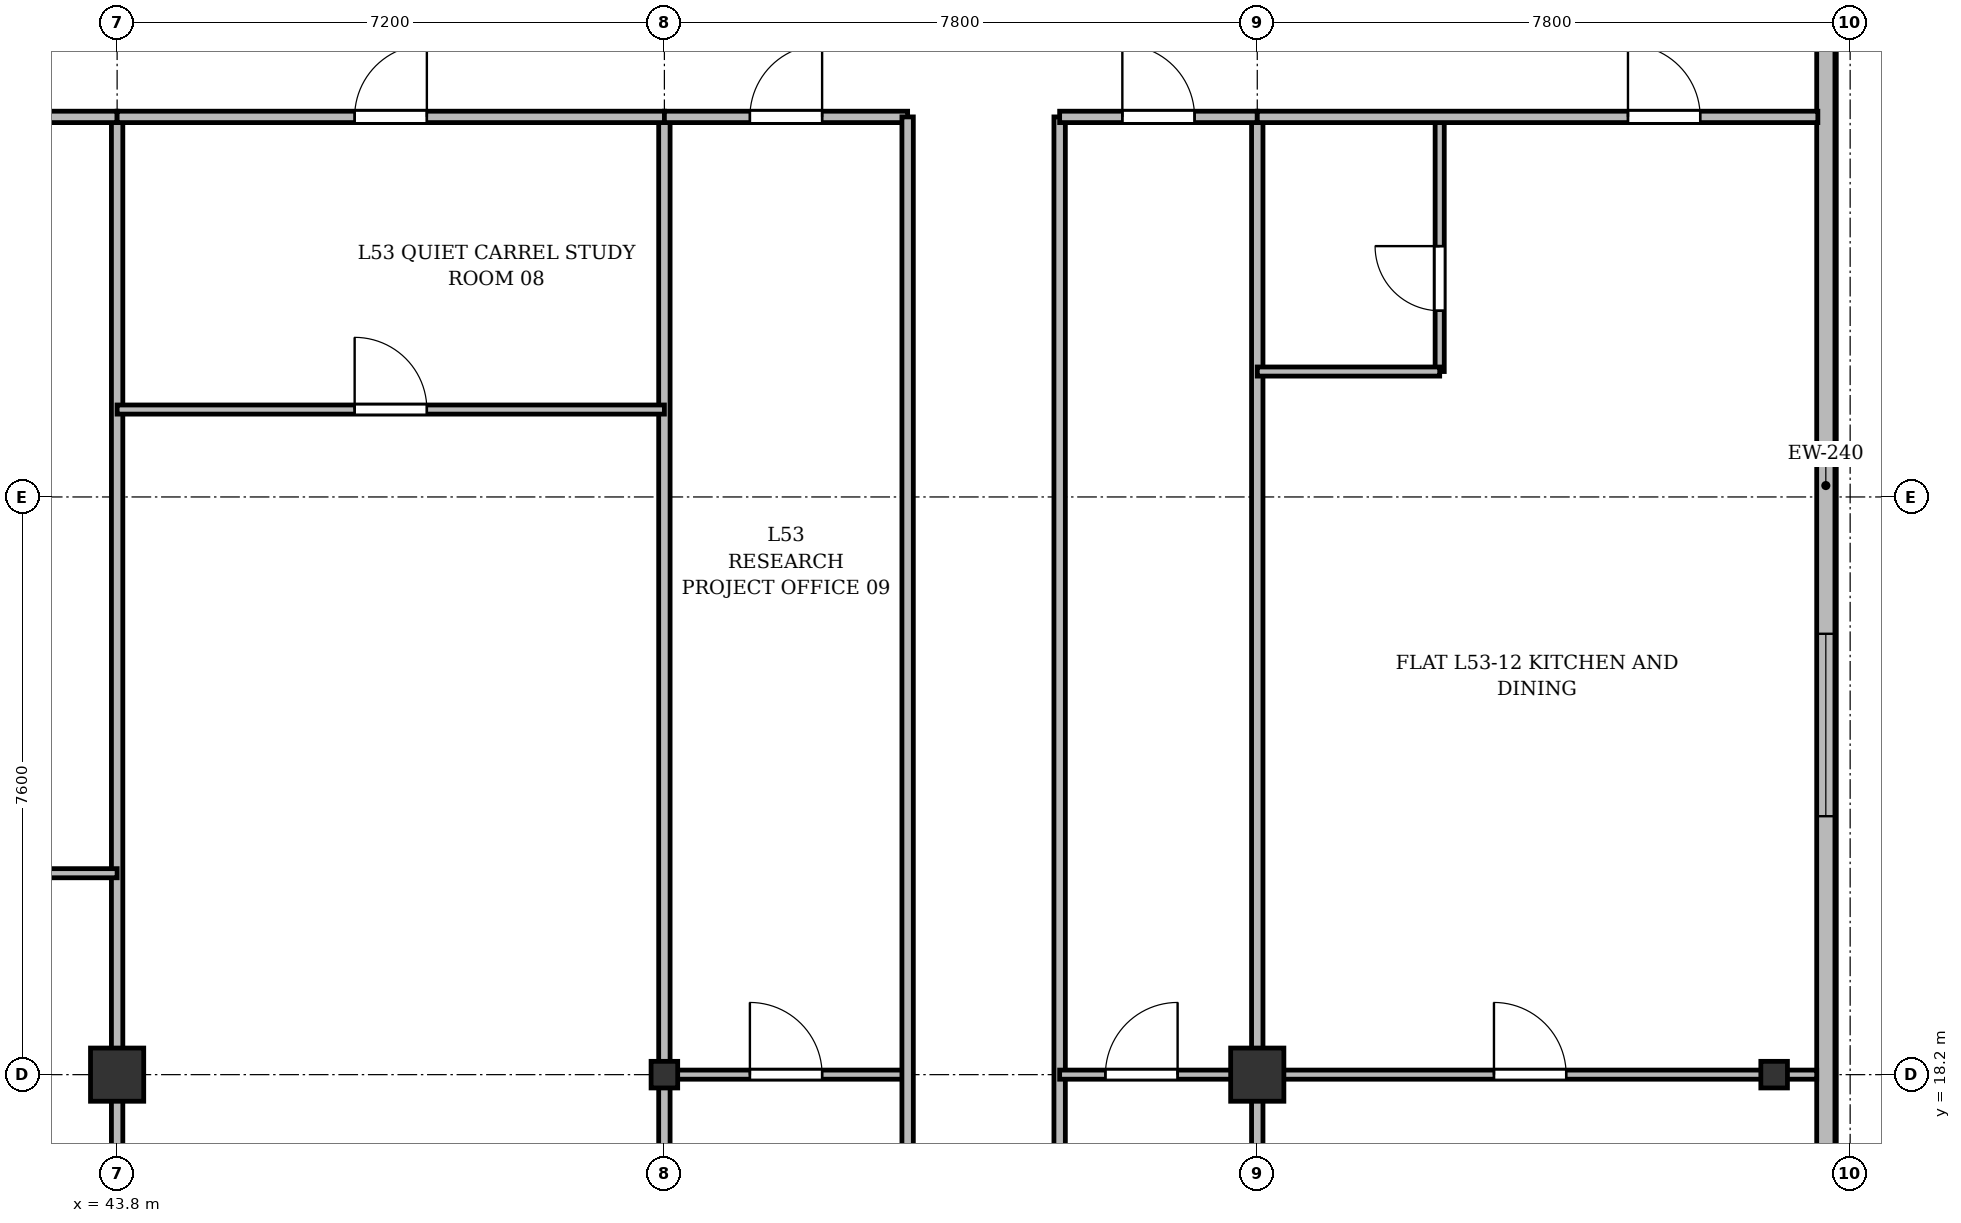
"""IFC4 building model, lengths in metres.
Left out: names, types, materials, properties, quantities, classifications, styles, units other than length and angle.
Written with IfcOpenShell. Run it as: python <this file> out.ifc"""

import sys

from ifc_helpers import new_model, si_unit, direction, frame, frame_2d, origin, origin_2d, place, context, subcontext, project, spatial, rectangle, i_section, extrude, source, transform, mapped, element, fill, save


model = new_model("IFC4")
c1 = context("Model", 3, precision=1e-05, world=origin(), true_north=direction((0.0, 1.0)))
c2 = subcontext(c1, "Body", "Model", "MODEL_VIEW")
j1 = project(units=[si_unit("LENGTHUNIT", "METRE"), si_unit("PLANEANGLEUNIT", "RADIAN")], contexts=[c1])
p1 = place(None, origin())
s1 = spatial("IfcSite", under=j1, at=p1, CompositionType="ELEMENT")
p2 = place(p1, origin())
s2 = spatial("IfcBuilding", under=s1, at=p2, CompositionType="ELEMENT")
p3 = place(p2, frame((0.0, 0.0, 204.9)))
s3 = spatial("IfcBuildingStorey", under=s2, at=p3, CompositionType="ELEMENT", Elevation=204.9)
m1 = source(origin(), c2, "Body", "SweptSolid", [
    extrude(rectangle(XDim=0.7, YDim=0.7, at=origin_2d()), origin(), (0.0, 0.0, 1.0), 3.6),
])
p4 = place(p3, frame((43.8, 18.2, 0.0), z_axis=(0.0, 0.0, 1.0), x_axis=(1.0, 0.0, 0.0)))
e1 = element("IfcColumn", 1, at=p4, inside=s3, PredefinedType="COLUMN", context=c2, shape_type="MappedRepresentation", body=[
    mapped(m1, transform((0.0, 0.0, 0.0), x_axis=(1.0, 0.0, 0.0), y_axis=(0.0, 1.0, 0.0), z_axis=(0.0, 0.0, 1.0), scale=1.0)),
])
m2 = source(origin(), c2, "Body", "SweptSolid", [
    extrude(i_section(OverallWidth=0.35, OverallDepth=0.35, WebThickness=0.018, FlangeThickness=0.028, at=origin_2d()), origin(), (0.0, 0.0, 1.0), 3.6),
])
p5 = place(p3, frame((51.0, 18.2, 0.0), z_axis=(0.0, 0.0, 1.0), x_axis=(1.0, 0.0, 0.0)))
e2 = element("IfcColumn", 2, at=p5, inside=s3, PredefinedType="COLUMN", context=c2, shape_type="MappedRepresentation", body=[
    mapped(m2, transform((0.0, 0.0, 0.0), x_axis=(1.0, 0.0, 0.0), y_axis=(0.0, 1.0, 0.0), z_axis=(0.0, 0.0, 1.0), scale=1.0)),
])
p6 = place(p3, frame((58.8, 18.2, 0.0), z_axis=(0.0, 0.0, 1.0), x_axis=(1.0, 0.0, 0.0)))
e3 = element("IfcColumn", 3, at=p6, inside=s3, PredefinedType="COLUMN", context=c2, shape_type="MappedRepresentation", body=[
    mapped(m1, transform((0.0, 0.0, 0.0), x_axis=(1.0, 0.0, 0.0), y_axis=(0.0, 1.0, 0.0), z_axis=(0.0, 0.0, 1.0), scale=1.0)),
])
p7 = place(p3, frame((65.6, 18.2, 0.0), z_axis=(0.0, 0.0, 1.0), x_axis=(1.0, 0.0, 0.0)))
e4 = element("IfcColumn", 4, at=p7, inside=s3, PredefinedType="COLUMN", context=c2, shape_type="MappedRepresentation", body=[
    mapped(m2, transform((0.0, 0.0, 0.0), x_axis=(1.0, 0.0, 0.0), y_axis=(0.0, 1.0, 0.0), z_axis=(0.0, 0.0, 1.0), scale=1.0)),
])
p8 = place(p3, frame((66.28, 45.5, 0.0), z_axis=(0.0, 0.0, 1.0), x_axis=(0.0, -1.0, 0.0)))
e5 = element("IfcWall", 5, at=p8, inside=s3, PredefinedType="SOLIDWALL", context=c2, shape_type="SweptSolid", body=[
    extrude(rectangle(XDim=39.1, YDim=0.24, at=frame_2d((19.55, 0.0))), origin(), (0.0, 0.0, 1.0), 3.36),
])
p9 = place(p8, frame((36.45, 0.0, 0.92)))
e6 = element("IfcOpeningElement", 6, at=p9, cuts=e5, PredefinedType="OPENING", context=c2, shape_type="SweptSolid", body=[
    extrude(rectangle(XDim=1.2, YDim=1.65, at=frame_2d((0.6, 0.825))), frame((0.0, 0.13, 0.0), z_axis=(0.0, -1.0, 0.0), x_axis=(1.0, 0.0, 0.0)), (0.0, 0.0, 1.0), 0.26),
])
p10 = place(p8, frame((32.9, 0.0, 0.92)))
e7 = element("IfcOpeningElement", 7, at=p10, cuts=e5, PredefinedType="OPENING", context=c2, shape_type="SweptSolid", body=[
    extrude(rectangle(XDim=2.4, YDim=2.1, at=frame_2d((1.2, 1.05))), frame((0.0, 0.13, 0.0), z_axis=(0.0, -1.0, 0.0), x_axis=(1.0, 0.0, 0.0)), (0.0, 0.0, 1.0), 0.26),
])
p11 = place(p8, frame((28.7, 0.0, 0.92)))
e8 = element("IfcOpeningElement", 8, at=p11, cuts=e5, PredefinedType="OPENING", context=c2, shape_type="SweptSolid", body=[
    extrude(rectangle(XDim=2.4, YDim=2.1, at=frame_2d((1.2, 1.05))), frame((0.0, 0.13, 0.0), z_axis=(0.0, -1.0, 0.0), x_axis=(1.0, 0.0, 0.0)), (0.0, 0.0, 1.0), 0.26),
])
p12 = place(p8, frame((21.5, 0.0, 0.92)))
e9 = element("IfcOpeningElement", 9, at=p12, cuts=e5, PredefinedType="OPENING", context=c2, shape_type="SweptSolid", body=[
    extrude(rectangle(XDim=2.4, YDim=2.1, at=frame_2d((1.2, 1.05))), frame((0.0, 0.13, 0.0), z_axis=(0.0, -1.0, 0.0), x_axis=(1.0, 0.0, 0.0)), (0.0, 0.0, 1.0), 0.26),
])
p13 = place(p8, frame((7.5, 0.0, 0.92)))
e10 = element("IfcOpeningElement", 10, at=p13, cuts=e5, PredefinedType="OPENING", context=c2, shape_type="SweptSolid", body=[
    extrude(rectangle(XDim=2.4, YDim=2.1, at=frame_2d((1.2, 1.05))), frame((0.0, 0.13, 0.0), z_axis=(0.0, -1.0, 0.0), x_axis=(1.0, 0.0, 0.0)), (0.0, 0.0, 1.0), 0.26),
])
p14 = place(p8, frame((4.5, 0.0, 0.92)))
e11 = element("IfcOpeningElement", 11, at=p14, cuts=e5, PredefinedType="OPENING", context=c2, shape_type="SweptSolid", body=[
    extrude(rectangle(XDim=1.2, YDim=1.65, at=frame_2d((0.6, 0.825))), frame((0.0, 0.13, 0.0), z_axis=(0.0, -1.0, 0.0), x_axis=(1.0, 0.0, 0.0)), (0.0, 0.0, 1.0), 0.26),
])
p15 = place(p8, frame((1.15, 0.0, 0.92)))
e12 = element("IfcOpeningElement", 12, at=p15, cuts=e5, PredefinedType="OPENING", context=c2, shape_type="SweptSolid", body=[
    extrude(rectangle(XDim=1.2, YDim=1.65, at=frame_2d((0.6, 0.825))), frame((0.0, 0.13, 0.0), z_axis=(0.0, -1.0, 0.0), x_axis=(1.0, 0.0, 0.0)), (0.0, 0.0, 1.0), 0.26),
])
for number, where, z_axis, x_axis in (
    (13, (43.8, 3.625, 0.0), (0.0, 0.0, 1.0), (0.0, 1.0, 0.0)),
    (14, (51.0, 3.625, 0.0), (0.0, 0.0, 1.0), (0.0, 1.0, 0.0)),
    (15, (58.8, 3.625, 0.0), (0.0, 0.0, 1.0), (0.0, 1.0, 0.0)),
):
    element("IfcWall", number, at=place(p3, frame(where, z_axis=z_axis, x_axis=x_axis)), inside=s3, PredefinedType="PARTITIONING", context=c2, shape_type="SweptSolid", body=[
        extrude(rectangle(XDim=27.175, YDim=0.15, at=frame_2d((13.587, 0.0))), origin(), (0.0, 0.0, 1.0), 2.86),
    ])
p16 = place(p3, frame((35.8, 20.85, 0.0), z_axis=(0.0, 0.0, 1.0), x_axis=(1.0, 0.0, 0.0)))
e16 = element("IfcWall", 16, at=p16, inside=s3, PredefinedType="PARTITIONING", context=c2, shape_type="SweptSolid", body=[
    extrude(rectangle(XDim=8.0, YDim=0.12, at=frame_2d((4.0, 0.0))), origin(), (0.0, 0.0, 1.0), 2.86),
])
p17 = place(p16, frame((3.525, 0.0, 0.0)))
e17 = element("IfcOpeningElement", 17, at=p17, cuts=e16, PredefinedType="OPENING", context=c2, shape_type="SweptSolid", body=[
    extrude(rectangle(XDim=0.95, YDim=2.15, at=frame_2d((0.475, 1.075))), frame((0.0, 0.07, 0.0), z_axis=(0.0, -1.0, 0.0), x_axis=(1.0, 0.0, 0.0)), (0.0, 0.0, 1.0), 0.14),
])
p18 = place(p3, frame((35.8, 30.8, 0.0), z_axis=(0.0, 0.0, 1.0), x_axis=(1.0, 0.0, 0.0)))
e18 = element("IfcWall", 18, at=p18, inside=s3, PredefinedType="PARTITIONING", context=c2, shape_type="SweptSolid", body=[
    extrude(rectangle(XDim=8.0, YDim=0.15, at=frame_2d((4.0, 0.0))), origin(), (0.0, 0.0, 1.0), 2.86),
])
p19 = place(p18, frame((5.367, 0.0, 0.0)))
e19 = element("IfcOpeningElement", 19, at=p19, cuts=e18, PredefinedType="OPENING", context=c2, shape_type="SweptSolid", body=[
    extrude(rectangle(XDim=0.95, YDim=2.15, at=frame_2d((0.475, 1.075))), frame((0.0, 0.085, 0.0), z_axis=(0.0, -1.0, 0.0), x_axis=(1.0, 0.0, 0.0)), (0.0, 0.0, 1.0), 0.17),
])
p20 = place(p3, frame((43.8, 30.8, 0.0), z_axis=(0.0, 0.0, 1.0), x_axis=(1.0, 0.0, 0.0)))
e20 = element("IfcWall", 20, at=p20, inside=s3, PredefinedType="PARTITIONING", context=c2, shape_type="SweptSolid", body=[
    extrude(rectangle(XDim=7.2, YDim=0.15, at=frame_2d((3.6, 0.0))), origin(), (0.0, 0.0, 1.0), 2.86),
])
p21 = place(p20, frame((3.125, 0.0, 0.0)))
e21 = element("IfcOpeningElement", 21, at=p21, cuts=e20, PredefinedType="OPENING", context=c2, shape_type="SweptSolid", body=[
    extrude(rectangle(XDim=0.95, YDim=2.15, at=frame_2d((0.475, 1.075))), frame((0.0, 0.085, 0.0), z_axis=(0.0, -1.0, 0.0), x_axis=(1.0, 0.0, 0.0)), (0.0, 0.0, 1.0), 0.17),
])
p22 = place(p3, frame((43.8, 26.95, 0.0), z_axis=(0.0, 0.0, 1.0), x_axis=(1.0, 0.0, 0.0)))
e22 = element("IfcWall", 22, at=p22, inside=s3, PredefinedType="PARTITIONING", context=c2, shape_type="SweptSolid", body=[
    extrude(rectangle(XDim=7.2, YDim=0.12, at=frame_2d((3.6, 0.0))), origin(), (0.0, 0.0, 1.0), 2.86),
])
p23 = place(p22, frame((3.125, 0.0, 0.0)))
e23 = element("IfcOpeningElement", 23, at=p23, cuts=e22, PredefinedType="OPENING", context=c2, shape_type="SweptSolid", body=[
    extrude(rectangle(XDim=0.95, YDim=2.15, at=frame_2d((0.475, 1.075))), frame((0.0, 0.07, 0.0), z_axis=(0.0, -1.0, 0.0), x_axis=(1.0, 0.0, 0.0)), (0.0, 0.0, 1.0), 0.14),
])
p24 = place(p3, frame((51.0, 30.8, 0.0), z_axis=(0.0, 0.0, 1.0), x_axis=(1.0, 0.0, 0.0)))
e24 = element("IfcWall", 24, at=p24, inside=s3, PredefinedType="PARTITIONING", context=c2, shape_type="SweptSolid", body=[
    extrude(rectangle(XDim=3.2, YDim=0.15, at=frame_2d((1.6, 0.0))), origin(), (0.0, 0.0, 1.0), 2.86),
])
p25 = place(p24, frame((1.125, 0.0, 0.0)))
e25 = element("IfcOpeningElement", 25, at=p25, cuts=e24, PredefinedType="OPENING", context=c2, shape_type="SweptSolid", body=[
    extrude(rectangle(XDim=0.95, YDim=2.15, at=frame_2d((0.475, 1.075))), frame((0.0, 0.085, 0.0), z_axis=(0.0, -1.0, 0.0), x_axis=(1.0, 0.0, 0.0)), (0.0, 0.0, 1.0), 0.17),
])
p26 = place(p3, frame((51.0, 18.2, 0.0), z_axis=(0.0, 0.0, 1.0), x_axis=(1.0, 0.0, 0.0)))
e26 = element("IfcWall", 26, at=p26, inside=s3, PredefinedType="PARTITIONING", context=c2, shape_type="SweptSolid", body=[
    extrude(rectangle(XDim=3.2, YDim=0.12, at=frame_2d((1.6, 0.0))), origin(), (0.0, 0.0, 1.0), 2.91),
])
p27 = place(p26, frame((1.125, 0.0, 0.0)))
e27 = element("IfcOpeningElement", 27, at=p27, cuts=e26, PredefinedType="OPENING", context=c2, shape_type="SweptSolid", body=[
    extrude(rectangle(XDim=0.95, YDim=2.15, at=frame_2d((0.475, 1.075))), frame((0.0, 0.07, 0.0), z_axis=(0.0, -1.0, 0.0), x_axis=(1.0, 0.0, 0.0)), (0.0, 0.0, 1.0), 0.14),
])
for number, where, z_axis, x_axis in (
    (28, (54.2, 3.625, 0.0), (0.0, 0.0, 1.0), (0.0, 1.0, 0.0)),
    (29, (56.2, 3.625, 0.0), (0.0, 0.0, 1.0), (0.0, 1.0, 0.0)),
):
    element("IfcWall", number, at=place(p3, frame(where, z_axis=z_axis, x_axis=x_axis)), inside=s3, PredefinedType="PARTITIONING", context=c2, shape_type="SweptSolid", body=[
        extrude(rectangle(XDim=27.175, YDim=0.15, at=frame_2d((13.587, 0.0))), origin(), (0.0, 0.0, 1.0), 2.91),
    ])
p28 = place(p3, frame((56.2, 30.8, 0.0), z_axis=(0.0, 0.0, 1.0), x_axis=(1.0, 0.0, 0.0)))
e30 = element("IfcWall", 30, at=p28, inside=s3, PredefinedType="PARTITIONING", context=c2, shape_type="SweptSolid", body=[
    extrude(rectangle(XDim=2.6, YDim=0.15, at=frame_2d((1.3, 0.0))), origin(), (0.0, 0.0, 1.0), 2.86),
])
p29 = place(p28, frame((0.825, 0.0, 0.0)))
e31 = element("IfcOpeningElement", 31, at=p29, cuts=e30, PredefinedType="OPENING", context=c2, shape_type="SweptSolid", body=[
    extrude(rectangle(XDim=0.95, YDim=2.15, at=frame_2d((0.475, 1.075))), frame((0.0, 0.085, 0.0), z_axis=(0.0, -1.0, 0.0), x_axis=(1.0, 0.0, 0.0)), (0.0, 0.0, 1.0), 0.17),
])
p30 = place(p3, frame((56.2, 18.2, 0.0), z_axis=(0.0, 0.0, 1.0), x_axis=(1.0, 0.0, 0.0)))
e32 = element("IfcWall", 32, at=p30, inside=s3, PredefinedType="PARTITIONING", context=c2, shape_type="SweptSolid", body=[
    extrude(rectangle(XDim=2.6, YDim=0.12, at=frame_2d((1.3, 0.0))), origin(), (0.0, 0.0, 1.0), 2.91),
])
p31 = place(p30, frame((0.602, 0.0, 0.0)))
e33 = element("IfcOpeningElement", 33, at=p31, cuts=e32, PredefinedType="OPENING", context=c2, shape_type="SweptSolid", body=[
    extrude(rectangle(XDim=0.95, YDim=2.15, at=frame_2d((0.475, 1.075))), frame((0.0, 0.07, 0.0), z_axis=(0.0, -1.0, 0.0), x_axis=(1.0, 0.0, 0.0)), (0.0, 0.0, 1.0), 0.14),
])
p32 = place(p3, frame((58.8, 18.2, 0.0), z_axis=(0.0, 0.0, 1.0), x_axis=(1.0, 0.0, 0.0)))
e34 = element("IfcWall", 34, at=p32, inside=s3, PredefinedType="PARTITIONING", context=c2, shape_type="SweptSolid", body=[
    extrude(rectangle(XDim=7.36, YDim=0.12, at=frame_2d((3.68, 0.0))), origin(), (0.0, 0.0, 1.0), 2.91),
])
p33 = place(p32, frame((3.114, 0.0, 0.0)))
e35 = element("IfcOpeningElement", 35, at=p33, cuts=e34, PredefinedType="OPENING", context=c2, shape_type="SweptSolid", body=[
    extrude(rectangle(XDim=0.95, YDim=2.15, at=frame_2d((0.475, 1.075))), frame((0.0, 0.07, 0.0), z_axis=(0.0, -1.0, 0.0), x_axis=(1.0, 0.0, 0.0)), (0.0, 0.0, 1.0), 0.14),
])
p34 = place(p3, frame((61.2, 27.45, 0.0), z_axis=(0.0, 0.0, 1.0), x_axis=(0.0, 1.0, 0.0)))
e36 = element("IfcWall", 36, at=p34, inside=s3, PredefinedType="PARTITIONING", context=c2, shape_type="SweptSolid", body=[
    extrude(rectangle(XDim=3.35, YDim=0.12, at=frame_2d((1.675, 0.0))), origin(), (0.0, 0.0, 1.0), 3.36),
])
p35 = place(p34, frame((0.8, 0.0, 0.0)))
e37 = element("IfcOpeningElement", 37, at=p35, cuts=e36, PredefinedType="OPENING", context=c2, shape_type="SweptSolid", body=[
    extrude(rectangle(XDim=0.85, YDim=2.1, at=frame_2d((0.425, 1.05))), frame((0.0, 0.07, 0.0), z_axis=(0.0, -1.0, 0.0), x_axis=(1.0, 0.0, 0.0)), (0.0, 0.0, 1.0), 0.14),
])
p36 = place(p3, frame((58.8, 27.45, 0.0), z_axis=(0.0, 0.0, 1.0), x_axis=(1.0, 0.0, 0.0)))
e38 = element("IfcWall", 38, at=p36, inside=s3, PredefinedType="PARTITIONING", context=c2, shape_type="SweptSolid", body=[
    extrude(rectangle(XDim=2.4, YDim=0.12, at=frame_2d((1.2, 0.0))), origin(), (0.0, 0.0, 1.0), 2.86),
])
p37 = place(p3, frame((58.8, 30.8, 0.0), z_axis=(0.0, 0.0, 1.0), x_axis=(1.0, 0.0, 0.0)))
e39 = element("IfcWall", 39, at=p37, inside=s3, PredefinedType="PARTITIONING", context=c2, shape_type="SweptSolid", body=[
    extrude(rectangle(XDim=7.375, YDim=0.15, at=frame_2d((3.688, 0.0))), origin(), (0.0, 0.0, 1.0), 2.86),
])
p38 = place(p37, frame((4.877, 0.0, 0.0)))
e40 = element("IfcOpeningElement", 40, at=p38, cuts=e39, PredefinedType="OPENING", context=c2, shape_type="SweptSolid", body=[
    extrude(rectangle(XDim=0.95, YDim=2.15, at=frame_2d((0.475, 1.075))), frame((0.0, 0.085, 0.0), z_axis=(0.0, -1.0, 0.0), x_axis=(1.0, 0.0, 0.0)), (0.0, 0.0, 1.0), 0.17),
])
m3 = source(origin(), c2, "Body", "SweptSolid", [
    extrude(rectangle(XDim=2.4, YDim=2.1, at=frame_2d((1.2, 1.05))), frame((0.0, 0.03, 0.0), z_axis=(0.0, -1.0, 0.0), x_axis=(1.0, 0.0, 0.0)), (0.0, 0.0, 1.0), 0.06),
])
p39 = place(p12, origin())
e41 = element("IfcWindow", 41, at=p39, inside=s3, PartitioningType="SINGLE_PANEL", PredefinedType="WINDOW", context=c2, shape_type="MappedRepresentation", body=[
    mapped(m3, transform((0.0, 0.0, 0.0), x_axis=(1.0, 0.0, 0.0), y_axis=(0.0, 1.0, 0.0), z_axis=(0.0, 0.0, 1.0), scale=1.0)),
])
fill(e9, e41)
m4 = source(origin(), c2, "Body", "SweptSolid", [
    extrude(rectangle(XDim=0.95, YDim=2.15, at=frame_2d((0.475, 1.075))), frame((0.0, 0.025, 0.0), z_axis=(0.0, -1.0, 0.0), x_axis=(1.0, 0.0, 0.0)), (0.0, 0.0, 1.0), 0.05),
])
p40 = place(p21, origin())
e42 = element("IfcDoor", 42, at=p40, inside=s3, OperationType="SINGLE_SWING_RIGHT", PredefinedType="DOOR", context=c2, shape_type="MappedRepresentation", body=[
    mapped(m4, transform((0.0, 0.0, 0.0), x_axis=(1.0, 0.0, 0.0), y_axis=(0.0, 1.0, 0.0), z_axis=(0.0, 0.0, 1.0), scale=1.0)),
])
fill(e21, e42)
p41 = place(p23, origin())
e43 = element("IfcDoor", 43, at=p41, inside=s3, OperationType="SINGLE_SWING_LEFT", PredefinedType="DOOR", context=c2, shape_type="MappedRepresentation", body=[
    mapped(m4, transform((0.0, 0.0, 0.0), x_axis=(1.0, 0.0, 0.0), y_axis=(0.0, 1.0, 0.0), z_axis=(0.0, 0.0, 1.0), scale=1.0)),
])
fill(e23, e43)
p42 = place(p25, origin())
e44 = element("IfcDoor", 44, at=p42, inside=s3, OperationType="SINGLE_SWING_RIGHT", PredefinedType="DOOR", context=c2, shape_type="MappedRepresentation", body=[
    mapped(m4, transform((0.0, 0.0, 0.0), x_axis=(1.0, 0.0, 0.0), y_axis=(0.0, 1.0, 0.0), z_axis=(0.0, 0.0, 1.0), scale=1.0)),
])
fill(e25, e44)
p43 = place(p27, origin())
e45 = element("IfcDoor", 45, at=p43, inside=s3, OperationType="SINGLE_SWING_LEFT", PredefinedType="DOOR", context=c2, shape_type="MappedRepresentation", body=[
    mapped(m4, transform((0.0, 0.0, 0.0), x_axis=(1.0, 0.0, 0.0), y_axis=(0.0, 1.0, 0.0), z_axis=(0.0, 0.0, 1.0), scale=1.0)),
])
fill(e27, e45)
p44 = place(p29, origin())
e46 = element("IfcDoor", 46, at=p44, inside=s3, OperationType="SINGLE_SWING_LEFT", PredefinedType="DOOR", context=c2, shape_type="MappedRepresentation", body=[
    mapped(m4, transform((0.0, 0.0, 0.0), x_axis=(1.0, 0.0, 0.0), y_axis=(0.0, 1.0, 0.0), z_axis=(0.0, 0.0, 1.0), scale=1.0)),
])
fill(e31, e46)
p45 = place(p31, origin())
e47 = element("IfcDoor", 47, at=p45, inside=s3, OperationType="SINGLE_SWING_RIGHT", PredefinedType="DOOR", context=c2, shape_type="MappedRepresentation", body=[
    mapped(m4, transform((0.0, 0.0, 0.0), x_axis=(1.0, 0.0, 0.0), y_axis=(0.0, 1.0, 0.0), z_axis=(0.0, 0.0, 1.0), scale=1.0)),
])
fill(e33, e47)
p46 = place(p33, origin())
e48 = element("IfcDoor", 48, at=p46, inside=s3, OperationType="SINGLE_SWING_LEFT", PredefinedType="DOOR", context=c2, shape_type="MappedRepresentation", body=[
    mapped(m4, transform((0.0, 0.0, 0.0), x_axis=(1.0, 0.0, 0.0), y_axis=(0.0, 1.0, 0.0), z_axis=(0.0, 0.0, 1.0), scale=1.0)),
])
fill(e35, e48)
m5 = source(origin(), c2, "Body", "SweptSolid", [
    extrude(rectangle(XDim=0.85, YDim=2.1, at=frame_2d((0.425, 1.05))), frame((0.0, 0.025, 0.0), z_axis=(0.0, -1.0, 0.0), x_axis=(1.0, 0.0, 0.0)), (0.0, 0.0, 1.0), 0.05),
])
p47 = place(p35, origin())
e49 = element("IfcDoor", 49, at=p47, inside=s3, OperationType="SINGLE_SWING_RIGHT", PredefinedType="DOOR", context=c2, shape_type="MappedRepresentation", body=[
    mapped(m5, transform((0.0, 0.0, 0.0), x_axis=(1.0, 0.0, 0.0), y_axis=(0.0, 1.0, 0.0), z_axis=(0.0, 0.0, 1.0), scale=1.0)),
])
fill(e37, e49)
p48 = place(p38, origin())
e50 = element("IfcDoor", 50, at=p48, inside=s3, OperationType="SINGLE_SWING_LEFT", PredefinedType="DOOR", context=c2, shape_type="MappedRepresentation", body=[
    mapped(m4, transform((0.0, 0.0, 0.0), x_axis=(1.0, 0.0, 0.0), y_axis=(0.0, 1.0, 0.0), z_axis=(0.0, 0.0, 1.0), scale=1.0)),
])
fill(e40, e50)
save(model, sys.argv[1])
